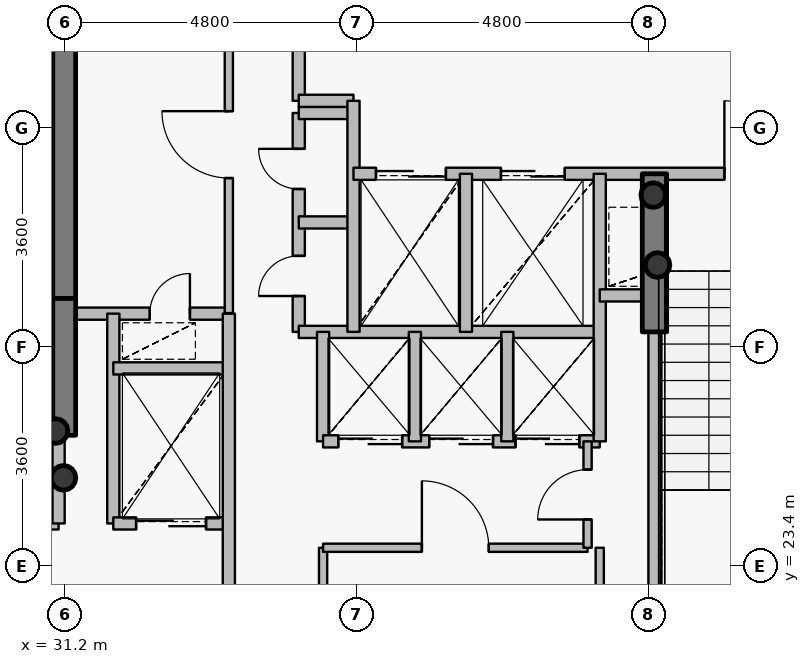
"""IFC4 building model, lengths in metres.
Left out: names, types, materials, properties, quantities, classifications, styles, units other than length and angle.
Written with IfcOpenShell. Run it as: python <this file> out.ifc"""

import sys

from ifc_helpers import new_model, si_unit, direction, frame, frame_2d, origin, origin_2d, place, context, subcontext, project, spatial, rectangle, hollow_circle, extrude, source, transform, mapped, element, fill, save


model = new_model("IFC4")
c1 = context("Model", 3, precision=1e-05, world=origin(), true_north=direction((0.0, 1.0)))
c2 = subcontext(c1, "Body", "Model", "MODEL_VIEW")
j1 = project(units=[si_unit("LENGTHUNIT", "METRE"), si_unit("PLANEANGLEUNIT", "RADIAN")], contexts=[c1])
p1 = place(None, origin())
s1 = spatial("IfcSite", under=j1, at=p1, CompositionType="ELEMENT")
p2 = place(p1, origin())
s2 = spatial("IfcBuilding", under=s1, at=p2, CompositionType="ELEMENT")
p3 = place(p2, frame((0.0, 0.0, 306.75)))
s3 = spatial("IfcBuildingStorey", under=s2, at=p3, CompositionType="ELEMENT", Elevation=306.75)
p4 = place(p3, frame((31.18, 27.8, 0.0), z_axis=(0.0, 0.0, 1.0), x_axis=(0.0, 1.0, 0.0)))
e1 = element("IfcWall", 1, at=p4, inside=s3, PredefinedType="SHEAR", context=c2, shape_type="SweptSolid", body=[
    extrude(rectangle(XDim=4.75, YDim=0.4, at=frame_2d((2.375, 0.0))), origin(), (0.0, 0.0, 1.0), 3.75),
])
for number, where, z_axis, x_axis in (
    (2, (31.05, 25.62, 0.0), (0.0, 0.0, 1.0), (1.0, 0.0, 0.0)),
    (3, (31.18, 24.85, 0.0), (0.0, 0.0, 1.0), (1.0, 0.0, 0.0)),
    (4, (40.95, 28.35, 0.0), (0.0, 0.0, 1.0), (1.0, 0.0, 0.0)),
    (5, (40.88, 29.5, 0.0), (0.0, 0.0, 1.0), (1.0, 0.0, 0.0)),
):
    element("IfcColumn", number, at=place(p3, frame(where, z_axis=z_axis, x_axis=x_axis)), inside=s3, PredefinedType="COLUMN", context=c2, shape_type="SweptSolid", body=[
        extrude(hollow_circle(Radius=0.203, WallThickness=0.016, at=origin_2d()), origin(), (0.0, 0.0, 1.0), 3.75),
    ])
p5 = place(p3, frame((31.18, 25.55, 0.0), z_axis=(0.0, 0.0, 1.0), x_axis=(0.0, 1.0, 0.0)))
e6 = element("IfcWall", 6, at=p5, inside=s3, PredefinedType="SHEAR", context=c2, shape_type="SweptSolid", body=[
    extrude(rectangle(XDim=2.25, YDim=0.4, at=frame_2d((1.125, 0.0))), origin(), (0.0, 0.0, 1.0), 3.1),
])
p6 = place(p3, frame((40.9, 27.25, 0.0), z_axis=(0.0, 0.0, 1.0), x_axis=(0.0, 1.0, 0.0)))
e7 = element("IfcWall", 7, at=p6, inside=s3, PredefinedType="SHEAR", context=c2, shape_type="SweptSolid", body=[
    extrude(rectangle(XDim=2.6, YDim=0.4, at=frame_2d((1.3, 0.0))), origin(), (0.0, 0.0, 1.0), 3.1),
])
p7 = place(p3, frame((27.56, 24.1, 0.0), z_axis=(0.0, 0.0, 1.0), x_axis=(1.0, 0.0, 0.0)))
e8 = element("IfcWall", 8, at=p7, inside=s3, PredefinedType="PARTITIONING", context=c2, shape_type="SweptSolid", body=[
    extrude(rectangle(XDim=3.54, YDim=0.2, at=frame_2d((1.77, 0.0))), origin(), (0.0, 0.0, 1.0), 3.5),
])
p8 = place(p7, frame((1.17, 0.0, 0.0)))
e9 = element("IfcOpeningElement", 9, at=p8, cuts=e8, PredefinedType="OPENING", context=c2, shape_type="SweptSolid", body=[
    extrude(rectangle(XDim=1.2, YDim=2.15, at=origin_2d()), frame((0.6, 0.11, 1.075), z_axis=(0.0, -1.0, 0.0), x_axis=(1.0, 0.0, 0.0)), (0.0, 0.0, 1.0), 0.22),
])
p9 = place(p3, frame((31.1, 24.1, 0.0), z_axis=(0.0, 0.0, 1.0), x_axis=(0.0, 1.0, 0.0)))
e10 = element("IfcWall", 10, at=p9, inside=s3, PredefinedType="PARTITIONING", context=c2, shape_type="SweptSolid", body=[
    extrude(rectangle(XDim=1.44, YDim=0.2, at=frame_2d((0.72, 0.0))), origin(), (0.0, 0.0, 1.0), 3.5),
])
p10 = place(p3, frame((31.1, 27.55, 0.0), z_axis=(0.0, 0.0, 1.0), x_axis=(1.0, 0.0, 0.0)))
e11 = element("IfcWall", 11, at=p10, inside=s3, PredefinedType="PARTITIONING", context=c2, shape_type="SweptSolid", body=[
    extrude(rectangle(XDim=2.8, YDim=0.2, at=frame_2d((1.4, 0.0))), origin(), (0.0, 0.0, 1.0), 3.085),
])
p11 = place(p10, frame((1.5, 0.0, 0.0)))
e12 = element("IfcOpeningElement", 12, at=p11, cuts=e11, PredefinedType="OPENING", context=c2, shape_type="SweptSolid", body=[
    extrude(rectangle(XDim=0.66, YDim=2.05, at=origin_2d()), frame((0.33, 0.11, 1.025), z_axis=(0.0, -1.0, 0.0), x_axis=(1.0, 0.0, 0.0)), (0.0, 0.0, 1.0), 0.22),
])
p12 = place(p3, frame((32.0, 24.1, 0.0), z_axis=(0.0, 0.0, 1.0), x_axis=(0.0, 1.0, 0.0)))
e13 = element("IfcWall", 13, at=p12, inside=s3, PredefinedType="PARTITIONING", context=c2, shape_type="SweptSolid", body=[
    extrude(rectangle(XDim=3.45, YDim=0.2, at=frame_2d((1.725, 0.0))), origin(), (0.0, 0.0, 1.0), 3.5),
])
p13 = place(p3, frame((32.0, 24.1, 0.0), z_axis=(0.0, 0.0, 1.0), x_axis=(1.0, 0.0, 0.0)))
e14 = element("IfcWall", 14, at=p13, inside=s3, PredefinedType="PARTITIONING", context=c2, shape_type="SweptSolid", body=[
    extrude(rectangle(XDim=1.9, YDim=0.2, at=frame_2d((0.95, 0.0))), origin(), (0.0, 0.0, 1.0), 3.085),
])
p14 = place(p13, frame((0.375, 0.0, 0.0)))
e15 = element("IfcOpeningElement", 15, at=p14, cuts=e14, PredefinedType="OPENING", context=c2, shape_type="SweptSolid", body=[
    extrude(rectangle(XDim=1.15, YDim=2.15, at=origin_2d()), frame((0.575, 0.11, 1.075), z_axis=(0.0, -1.0, 0.0), x_axis=(1.0, 0.0, 0.0)), (0.0, 0.0, 1.0), 0.22),
])
p15 = place(p3, frame((32.0, 26.65, 0.0), z_axis=(0.0, 0.0, 1.0), x_axis=(1.0, 0.0, 0.0)))
e16 = element("IfcWall", 16, at=p15, inside=s3, PredefinedType="PARTITIONING", context=c2, shape_type="SweptSolid", body=[
    extrude(rectangle(XDim=1.9, YDim=0.2, at=frame_2d((0.95, 0.0))), origin(), (0.0, 0.0, 1.0), 3.085),
])
p16 = place(p3, frame((33.9, 20.9, 0.0), z_axis=(0.0, 0.0, 1.0), x_axis=(0.0, 1.0, 0.0)))
e17 = element("IfcWall", 17, at=p16, inside=s3, PredefinedType="PARTITIONING", context=c2, shape_type="SweptSolid", body=[
    extrude(rectangle(XDim=6.65, YDim=0.2, at=frame_2d((3.325, 0.0))), origin(), (0.0, 0.0, 1.0), 3.085),
])
p17 = place(p3, frame((33.9, 27.56, 0.0), z_axis=(0.0, 0.0, 1.0), x_axis=(0.0, 1.0, 0.0)))
e18 = element("IfcWall", 18, at=p17, inside=s3, PredefinedType="PARTITIONING", context=c2, shape_type="SweptSolid", body=[
    extrude(rectangle(XDim=5.54, YDim=0.135, at=frame_2d((2.77, 0.0))), origin(), (0.0, 0.0, 1.0), 3.085),
])
p18 = place(p17, frame((2.22, 0.0, 0.0)))
e19 = element("IfcOpeningElement", 19, at=p18, cuts=e18, PredefinedType="OPENING", context=c2, shape_type="SweptSolid", body=[
    extrude(rectangle(XDim=1.1, YDim=2.15, at=origin_2d()), frame((0.55, 0.078, 1.075), z_axis=(0.0, -1.0, 0.0), x_axis=(1.0, 0.0, 0.0)), (0.0, 0.0, 1.0), 0.155),
])
p19 = place(p3, frame((35.05, 27.25, 0.0), z_axis=(0.0, 0.0, 1.0), x_axis=(0.0, 1.0, 0.0)))
e20 = element("IfcWall", 20, at=p19, inside=s3, PredefinedType="PARTITIONING", context=c2, shape_type="SweptSolid", body=[
    extrude(rectangle(XDim=3.6, YDim=0.2, at=frame_2d((1.8, 0.0))), origin(), (0.0, 0.0, 1.0), 3.5),
])
p20 = place(p19, frame((0.59, 0.0, 0.0)))
e21 = element("IfcOpeningElement", 21, at=p20, cuts=e20, PredefinedType="OPENING", context=c2, shape_type="SweptSolid", body=[
    extrude(rectangle(XDim=0.66, YDim=2.05, at=origin_2d()), frame((0.33, 0.11, 1.025), z_axis=(0.0, -1.0, 0.0), x_axis=(1.0, 0.0, 0.0)), (0.0, 0.0, 1.0), 0.22),
])
p21 = place(p19, frame((2.35, 0.0, 0.0)))
e22 = element("IfcOpeningElement", 22, at=p21, cuts=e20, PredefinedType="OPENING", context=c2, shape_type="SweptSolid", body=[
    extrude(rectangle(XDim=0.66, YDim=2.05, at=origin_2d()), frame((0.33, 0.11, 1.025), z_axis=(0.0, -1.0, 0.0), x_axis=(1.0, 0.0, 0.0)), (0.0, 0.0, 1.0), 0.22),
])
p22 = place(p3, frame((35.05, 27.25, 0.0), z_axis=(0.0, 0.0, 1.0), x_axis=(1.0, 0.0, 0.0)))
e23 = element("IfcWall", 23, at=p22, inside=s3, PredefinedType="PARTITIONING", context=c2, shape_type="SweptSolid", body=[
    extrude(rectangle(XDim=4.95, YDim=0.2, at=frame_2d((2.475, 0.0))), origin(), (0.0, 0.0, 1.0), 3.085),
])
for number, where, z_axis, x_axis in (
    (24, (35.05, 29.05, 0.0), (0.0, 0.0, 1.0), (1.0, 0.0, 0.0)),
    (25, (35.05, 30.85, 0.0), (0.0, 0.0, 1.0), (1.0, 0.0, 0.0)),
):
    element("IfcWall", number, at=place(p3, frame(where, z_axis=z_axis, x_axis=x_axis)), inside=s3, PredefinedType="PARTITIONING", context=c2, shape_type="SweptSolid", body=[
        extrude(rectangle(XDim=0.9, YDim=0.2, at=frame_2d((0.45, 0.0))), origin(), (0.0, 0.0, 1.0), 3.5),
    ])
p23 = place(p3, frame((35.05, 31.05, 0.0), z_axis=(0.0, 0.0, 1.0), x_axis=(0.0, 1.0, 0.0)))
e26 = element("IfcWall", 26, at=p23, inside=s3, PredefinedType="PARTITIONING", context=c2, shape_type="SweptSolid", body=[
    extrude(rectangle(XDim=2.05, YDim=0.2, at=frame_2d((1.025, 0.0))), origin(), (0.0, 0.0, 1.0), 3.085),
])
p24 = place(p3, frame((35.05, 31.05, 0.0), z_axis=(0.0, 0.0, 1.0), x_axis=(1.0, 0.0, 0.0)))
e27 = element("IfcWall", 27, at=p24, inside=s3, PredefinedType="PARTITIONING", context=c2, shape_type="SweptSolid", body=[
    extrude(rectangle(XDim=0.9, YDim=0.2, at=frame_2d((0.45, 0.0))), origin(), (0.0, 0.0, 1.0), 3.5),
])
p25 = place(p3, frame((35.45, 20.9, 0.0), z_axis=(0.0, 0.0, 1.0), x_axis=(0.0, 1.0, 0.0)))
e28 = element("IfcWall", 28, at=p25, inside=s3, PredefinedType="PARTITIONING", context=c2, shape_type="SweptSolid", body=[
    extrude(rectangle(XDim=2.8, YDim=0.135, at=frame_2d((1.4, 0.0))), origin(), (0.0, 0.0, 1.0), 3.085),
])
p26 = place(p3, frame((35.45, 23.7, 0.0), z_axis=(0.0, 0.0, 1.0), x_axis=(1.0, 0.0, 0.0)))
e29 = element("IfcWall", 29, at=p26, inside=s3, PredefinedType="PARTITIONING", context=c2, shape_type="SweptSolid", body=[
    extrude(rectangle(XDim=4.35, YDim=0.135, at=frame_2d((2.175, 0.0))), origin(), (0.0, 0.0, 1.0), 3.085),
])
p27 = place(p26, frame((1.625, 0.0, 0.0)))
e30 = element("IfcOpeningElement", 30, at=p27, cuts=e29, PredefinedType="OPENING", context=c2, shape_type="SweptSolid", body=[
    extrude(rectangle(XDim=1.1, YDim=2.15, at=origin_2d()), frame((0.55, 0.078, 1.075), z_axis=(0.0, -1.0, 0.0), x_axis=(1.0, 0.0, 0.0)), (0.0, 0.0, 1.0), 0.155),
])
p28 = place(p3, frame((35.45, 25.45, 0.0), z_axis=(0.0, 0.0, 1.0), x_axis=(0.0, 1.0, 0.0)))
e31 = element("IfcWall", 31, at=p28, inside=s3, PredefinedType="PARTITIONING", context=c2, shape_type="SweptSolid", body=[
    extrude(rectangle(XDim=1.8, YDim=0.2, at=frame_2d((0.9, 0.0))), origin(), (0.0, 0.0, 1.0), 3.5),
])
p29 = place(p3, frame((35.45, 25.45, 0.0), z_axis=(0.0, 0.0, 1.0), x_axis=(1.0, 0.0, 0.0)))
e32 = element("IfcWall", 32, at=p29, inside=s3, PredefinedType="PARTITIONING", context=c2, shape_type="SweptSolid", body=[
    extrude(rectangle(XDim=4.55, YDim=0.2, at=frame_2d((2.275, 0.0))), origin(), (0.0, 0.0, 1.0), 3.085),
])
p30 = place(p29, frame((0.25, 0.0, 0.0)))
e33 = element("IfcOpeningElement", 33, at=p30, cuts=e32, PredefinedType="OPENING", context=c2, shape_type="SweptSolid", body=[
    extrude(rectangle(XDim=1.05, YDim=2.15, at=origin_2d()), frame((0.525, 0.11, 1.075), z_axis=(0.0, -1.0, 0.0), x_axis=(1.0, 0.0, 0.0)), (0.0, 0.0, 1.0), 0.22),
])
p31 = place(p29, frame((1.745, 0.0, 0.0)))
e34 = element("IfcOpeningElement", 34, at=p31, cuts=e32, PredefinedType="OPENING", context=c2, shape_type="SweptSolid", body=[
    extrude(rectangle(XDim=1.05, YDim=2.15, at=origin_2d()), frame((0.525, 0.11, 1.075), z_axis=(0.0, -1.0, 0.0), x_axis=(1.0, 0.0, 0.0)), (0.0, 0.0, 1.0), 0.22),
])
p32 = place(p29, frame((3.165, 0.0, 0.0)))
e35 = element("IfcOpeningElement", 35, at=p32, cuts=e32, PredefinedType="OPENING", context=c2, shape_type="SweptSolid", body=[
    extrude(rectangle(XDim=1.05, YDim=2.15, at=origin_2d()), frame((0.525, 0.11, 1.075), z_axis=(0.0, -1.0, 0.0), x_axis=(1.0, 0.0, 0.0)), (0.0, 0.0, 1.0), 0.22),
])
p33 = place(p3, frame((35.95, 27.25, 0.0), z_axis=(0.0, 0.0, 1.0), x_axis=(0.0, 1.0, 0.0)))
e36 = element("IfcWall", 36, at=p33, inside=s3, PredefinedType="PARTITIONING", context=c2, shape_type="SweptSolid", body=[
    extrude(rectangle(XDim=3.8, YDim=0.2, at=frame_2d((1.9, 0.0))), origin(), (0.0, 0.0, 1.0), 3.5),
])
p34 = place(p3, frame((35.95, 29.85, 0.0), z_axis=(0.0, 0.0, 1.0), x_axis=(1.0, 0.0, 0.0)))
e37 = element("IfcWall", 37, at=p34, inside=s3, PredefinedType="PARTITIONING", context=c2, shape_type="SweptSolid", body=[
    extrude(rectangle(XDim=8.49, YDim=0.2, at=frame_2d((4.245, 0.0))), origin(), (0.0, 0.0, 1.0), 3.085),
])
p35 = place(p34, frame((6.1, 0.0, 0.0)))
e38 = element("IfcOpeningElement", 38, at=p35, cuts=e37, PredefinedType="OPENING", context=c2, shape_type="SweptSolid", body=[
    extrude(rectangle(XDim=1.2, YDim=2.15, at=origin_2d()), frame((0.6, 0.11, 1.075), z_axis=(0.0, -1.0, 0.0), x_axis=(1.0, 0.0, 0.0)), (0.0, 0.0, 1.0), 0.22),
])
p36 = place(p34, frame((0.37, 0.0, 0.0)))
e39 = element("IfcOpeningElement", 39, at=p36, cuts=e37, PredefinedType="OPENING", context=c2, shape_type="SweptSolid", body=[
    extrude(rectangle(XDim=1.15, YDim=2.15, at=origin_2d()), frame((0.575, 0.11, 1.075), z_axis=(0.0, -1.0, 0.0), x_axis=(1.0, 0.0, 0.0)), (0.0, 0.0, 1.0), 0.22),
])
p37 = place(p34, frame((2.425, 0.0, 0.0)))
e40 = element("IfcOpeningElement", 40, at=p37, cuts=e37, PredefinedType="OPENING", context=c2, shape_type="SweptSolid", body=[
    extrude(rectangle(XDim=1.05, YDim=2.15, at=origin_2d()), frame((0.525, 0.11, 1.075), z_axis=(0.0, -1.0, 0.0), x_axis=(1.0, 0.0, 0.0)), (0.0, 0.0, 1.0), 0.22),
])
p38 = place(p3, frame((36.96, 25.45, 0.0), z_axis=(0.0, 0.0, 1.0), x_axis=(0.0, 1.0, 0.0)))
e41 = element("IfcWall", 41, at=p38, inside=s3, PredefinedType="PARTITIONING", context=c2, shape_type="SweptSolid", body=[
    extrude(rectangle(XDim=1.8, YDim=0.2, at=frame_2d((0.9, 0.0))), origin(), (0.0, 0.0, 1.0), 3.5),
])
p39 = place(p3, frame((37.8, 27.25, 0.0), z_axis=(0.0, 0.0, 1.0), x_axis=(0.0, 1.0, 0.0)))
e42 = element("IfcWall", 42, at=p39, inside=s3, PredefinedType="PARTITIONING", context=c2, shape_type="SweptSolid", body=[
    extrude(rectangle(XDim=2.6, YDim=0.2, at=frame_2d((1.3, 0.0))), origin(), (0.0, 0.0, 1.0), 3.5),
])
p40 = place(p3, frame((38.48, 25.45, 0.0), z_axis=(0.0, 0.0, 1.0), x_axis=(0.0, 1.0, 0.0)))
e43 = element("IfcWall", 43, at=p40, inside=s3, PredefinedType="PARTITIONING", context=c2, shape_type="SweptSolid", body=[
    extrude(rectangle(XDim=1.8, YDim=0.2, at=frame_2d((0.9, 0.0))), origin(), (0.0, 0.0, 1.0), 3.5),
])
p41 = place(p3, frame((39.8, 23.7, 0.0), z_axis=(0.0, 0.0, 1.0), x_axis=(0.0, 1.0, 0.0)))
e44 = element("IfcWall", 44, at=p41, inside=s3, PredefinedType="PARTITIONING", context=c2, shape_type="SweptSolid", body=[
    extrude(rectangle(XDim=1.75, YDim=0.135, at=frame_2d((0.875, 0.0))), origin(), (0.0, 0.0, 1.0), 3.5),
])
p42 = place(p41, frame((0.465, 0.0, 0.0)))
e45 = element("IfcOpeningElement", 45, at=p42, cuts=e44, PredefinedType="OPENING", context=c2, shape_type="SweptSolid", body=[
    extrude(rectangle(XDim=0.82, YDim=2.1, at=origin_2d()), frame((0.41, 0.078, 1.05), z_axis=(0.0, -1.0, 0.0), x_axis=(1.0, 0.0, 0.0)), (0.0, 0.0, 1.0), 0.155),
])
p43 = place(p3, frame((40.0, 25.45, 0.0), z_axis=(0.0, 0.0, 1.0), x_axis=(0.0, 1.0, 0.0)))
e46 = element("IfcWall", 46, at=p43, inside=s3, PredefinedType="PARTITIONING", context=c2, shape_type="SweptSolid", body=[
    extrude(rectangle(XDim=4.4, YDim=0.2, at=frame_2d((2.2, 0.0))), origin(), (0.0, 0.0, 1.0), 3.5),
])
p44 = place(p3, frame((40.0, 27.85, 0.0), z_axis=(0.0, 0.0, 1.0), x_axis=(1.0, 0.0, 0.0)))
e47 = element("IfcWall", 47, at=p44, inside=s3, PredefinedType="PARTITIONING", context=c2, shape_type="SweptSolid", body=[
    extrude(rectangle(XDim=0.9, YDim=0.2, at=frame_2d((0.45, 0.0))), origin(), (0.0, 0.0, 1.0), 3.5),
])
p45 = place(p3, frame((40.9, 21.33, 0.0), z_axis=(0.0, 0.0, 1.0), x_axis=(0.0, 1.0, 0.0)))
e48 = element("IfcWall", 48, at=p45, inside=s3, PredefinedType="PARTITIONING", context=c2, shape_type="SweptSolid", body=[
    extrude(rectangle(XDim=5.91, YDim=0.2, at=frame_2d((2.955, 0.0))), origin(), (0.0, 0.0, 1.0), 3.035),
])
p46 = place(p3, frame((40.0, 23.7, 0.0), z_axis=(0.0, 0.0, 1.0), x_axis=(0.0, -1.0, 0.0)))
e49 = element("IfcWall", 49, at=p46, inside=s3, PredefinedType="PARTITIONING", context=c2, shape_type="SweptSolid", body=[
    extrude(rectangle(XDim=2.54, YDim=0.135, at=frame_2d((1.27, 0.0))), origin(), (0.0, 0.0, 1.0), 3.035),
])
m1 = source(origin(), c2, "Body", "SweptSolid", [
    extrude(rectangle(XDim=1.2, YDim=2.15, at=origin_2d()), frame((0.6, 0.025, 1.075), z_axis=(0.0, -1.0, 0.0), x_axis=(1.0, 0.0, 0.0)), (0.0, 0.0, 1.0), 0.05),
])
p47 = place(p35, origin())
e50 = element("IfcDoor", 50, at=p47, inside=s3, OperationType="SINGLE_SWING_LEFT", PredefinedType="DOOR", context=c2, shape_type="MappedRepresentation", body=[
    mapped(m1, transform((0.0, 0.0, 0.0), x_axis=(1.0, 0.0, 0.0), y_axis=(0.0, 1.0, 0.0), z_axis=(0.0, 0.0, 1.0), scale=1.0)),
])
fill(e38, e50)
m2 = source(origin(), c2, "Body", "SweptSolid", [
    extrude(rectangle(XDim=1.15, YDim=2.15, at=origin_2d()), frame((0.575, 0.025, 1.075), z_axis=(0.0, -1.0, 0.0), x_axis=(1.0, 0.0, 0.0)), (0.0, 0.0, 1.0), 0.05),
])
p48 = place(p36, origin())
e51 = element("IfcDoor", 51, at=p48, inside=s3, OperationType="DOUBLE_DOOR_SLIDING", PredefinedType="USERDEFINED", context=c2, shape_type="MappedRepresentation", body=[
    mapped(m2, transform((0.0, 0.0, 0.0), x_axis=(1.0, 0.0, 0.0), y_axis=(0.0, 1.0, 0.0), z_axis=(0.0, 0.0, 1.0), scale=1.0)),
])
fill(e39, e51)
p49 = place(p14, origin())
e52 = element("IfcDoor", 52, at=p49, inside=s3, OperationType="DOUBLE_DOOR_SLIDING", PredefinedType="USERDEFINED", context=c2, shape_type="MappedRepresentation", body=[
    mapped(m2, transform((0.0, 0.0, 0.0), x_axis=(1.0, 0.0, 0.0), y_axis=(0.0, 1.0, 0.0), z_axis=(0.0, 0.0, 1.0), scale=1.0)),
])
fill(e15, e52)
m3 = source(origin(), c2, "Body", "SweptSolid", [
    extrude(rectangle(XDim=1.05, YDim=2.15, at=origin_2d()), frame((0.525, 0.025, 1.075), z_axis=(0.0, -1.0, 0.0), x_axis=(1.0, 0.0, 0.0)), (0.0, 0.0, 1.0), 0.05),
])
p50 = place(p37, origin())
e53 = element("IfcDoor", 53, at=p50, inside=s3, OperationType="DOUBLE_DOOR_SLIDING", PredefinedType="USERDEFINED", context=c2, shape_type="MappedRepresentation", body=[
    mapped(m3, transform((0.0, 0.0, 0.0), x_axis=(1.0, 0.0, 0.0), y_axis=(0.0, 1.0, 0.0), z_axis=(0.0, 0.0, 1.0), scale=1.0)),
])
fill(e40, e53)
p51 = place(p30, origin())
e54 = element("IfcDoor", 54, at=p51, inside=s3, OperationType="DOUBLE_DOOR_SLIDING", PredefinedType="USERDEFINED", context=c2, shape_type="MappedRepresentation", body=[
    mapped(m3, transform((0.0, 0.0, 0.0), x_axis=(1.0, 0.0, 0.0), y_axis=(0.0, 1.0, 0.0), z_axis=(0.0, 0.0, 1.0), scale=1.0)),
])
fill(e33, e54)
p52 = place(p31, origin())
e55 = element("IfcDoor", 55, at=p52, inside=s3, OperationType="DOUBLE_DOOR_SLIDING", PredefinedType="USERDEFINED", context=c2, shape_type="MappedRepresentation", body=[
    mapped(m3, transform((0.0, 0.0, 0.0), x_axis=(1.0, 0.0, 0.0), y_axis=(0.0, 1.0, 0.0), z_axis=(0.0, 0.0, 1.0), scale=1.0)),
])
fill(e34, e55)
p53 = place(p32, origin())
e56 = element("IfcDoor", 56, at=p53, inside=s3, OperationType="DOUBLE_DOOR_SLIDING", PredefinedType="USERDEFINED", context=c2, shape_type="MappedRepresentation", body=[
    mapped(m3, transform((0.0, 0.0, 0.0), x_axis=(1.0, 0.0, 0.0), y_axis=(0.0, 1.0, 0.0), z_axis=(0.0, 0.0, 1.0), scale=1.0)),
])
fill(e35, e56)
m4 = source(origin(), c2, "Body", "SweptSolid", [
    extrude(rectangle(XDim=0.66, YDim=2.05, at=origin_2d()), frame((0.33, 0.025, 1.025), z_axis=(0.0, -1.0, 0.0), x_axis=(1.0, 0.0, 0.0)), (0.0, 0.0, 1.0), 0.05),
])
p54 = place(p20, origin())
e57 = element("IfcDoor", 57, at=p54, inside=s3, OperationType="SINGLE_SWING_LEFT", PredefinedType="USERDEFINED", context=c2, shape_type="MappedRepresentation", body=[
    mapped(m4, transform((0.0, 0.0, 0.0), x_axis=(1.0, 0.0, 0.0), y_axis=(0.0, 1.0, 0.0), z_axis=(0.0, 0.0, 1.0), scale=1.0)),
])
fill(e21, e57)
p55 = place(p21, origin())
e58 = element("IfcDoor", 58, at=p55, inside=s3, OperationType="SINGLE_SWING_RIGHT", PredefinedType="USERDEFINED", context=c2, shape_type="MappedRepresentation", body=[
    mapped(m4, transform((0.0, 0.0, 0.0), x_axis=(1.0, 0.0, 0.0), y_axis=(0.0, 1.0, 0.0), z_axis=(0.0, 0.0, 1.0), scale=1.0)),
])
fill(e22, e58)
m5 = source(origin(), c2, "Body", "SweptSolid", [
    extrude(rectangle(XDim=1.1, YDim=2.15, at=origin_2d()), frame((0.55, 0.025, 1.075), z_axis=(0.0, -1.0, 0.0), x_axis=(1.0, 0.0, 0.0)), (0.0, 0.0, 1.0), 0.05),
])
p56 = place(p27, origin())
e59 = element("IfcDoor", 59, at=p56, inside=s3, OperationType="SINGLE_SWING_LEFT", PredefinedType="DOOR", context=c2, shape_type="MappedRepresentation", body=[
    mapped(m5, transform((0.0, 0.0, 0.0), x_axis=(1.0, 0.0, 0.0), y_axis=(0.0, 1.0, 0.0), z_axis=(0.0, 0.0, 1.0), scale=1.0)),
])
fill(e30, e59)
p57 = place(p18, origin())
e60 = element("IfcDoor", 60, at=p57, inside=s3, OperationType="SINGLE_SWING_RIGHT", PredefinedType="DOOR", context=c2, shape_type="MappedRepresentation", body=[
    mapped(m5, transform((0.0, 0.0, 0.0), x_axis=(1.0, 0.0, 0.0), y_axis=(0.0, 1.0, 0.0), z_axis=(0.0, 0.0, 1.0), scale=1.0)),
])
fill(e19, e60)
m6 = source(origin(), c2, "Body", "SweptSolid", [
    extrude(rectangle(XDim=0.82, YDim=2.1, at=origin_2d()), frame((0.41, 0.025, 1.05), z_axis=(0.0, -1.0, 0.0), x_axis=(1.0, 0.0, 0.0)), (0.0, 0.0, 1.0), 0.05),
])
p58 = place(p42, origin())
e61 = element("IfcDoor", 61, at=p58, inside=s3, OperationType="SINGLE_SWING_LEFT", PredefinedType="DOOR", context=c2, shape_type="MappedRepresentation", body=[
    mapped(m6, transform((0.0, 0.0, 0.0), x_axis=(1.0, 0.0, 0.0), y_axis=(0.0, 1.0, 0.0), z_axis=(0.0, 0.0, 1.0), scale=1.0)),
])
fill(e45, e61)
p59 = place(p11, origin())
e62 = element("IfcDoor", 62, at=p59, inside=s3, OperationType="SINGLE_SWING_RIGHT", PredefinedType="USERDEFINED", context=c2, shape_type="MappedRepresentation", body=[
    mapped(m4, transform((0.0, 0.0, 0.0), x_axis=(1.0, 0.0, 0.0), y_axis=(0.0, 1.0, 0.0), z_axis=(0.0, 0.0, 1.0), scale=1.0)),
])
fill(e12, e62)
save(model, sys.argv[1])
